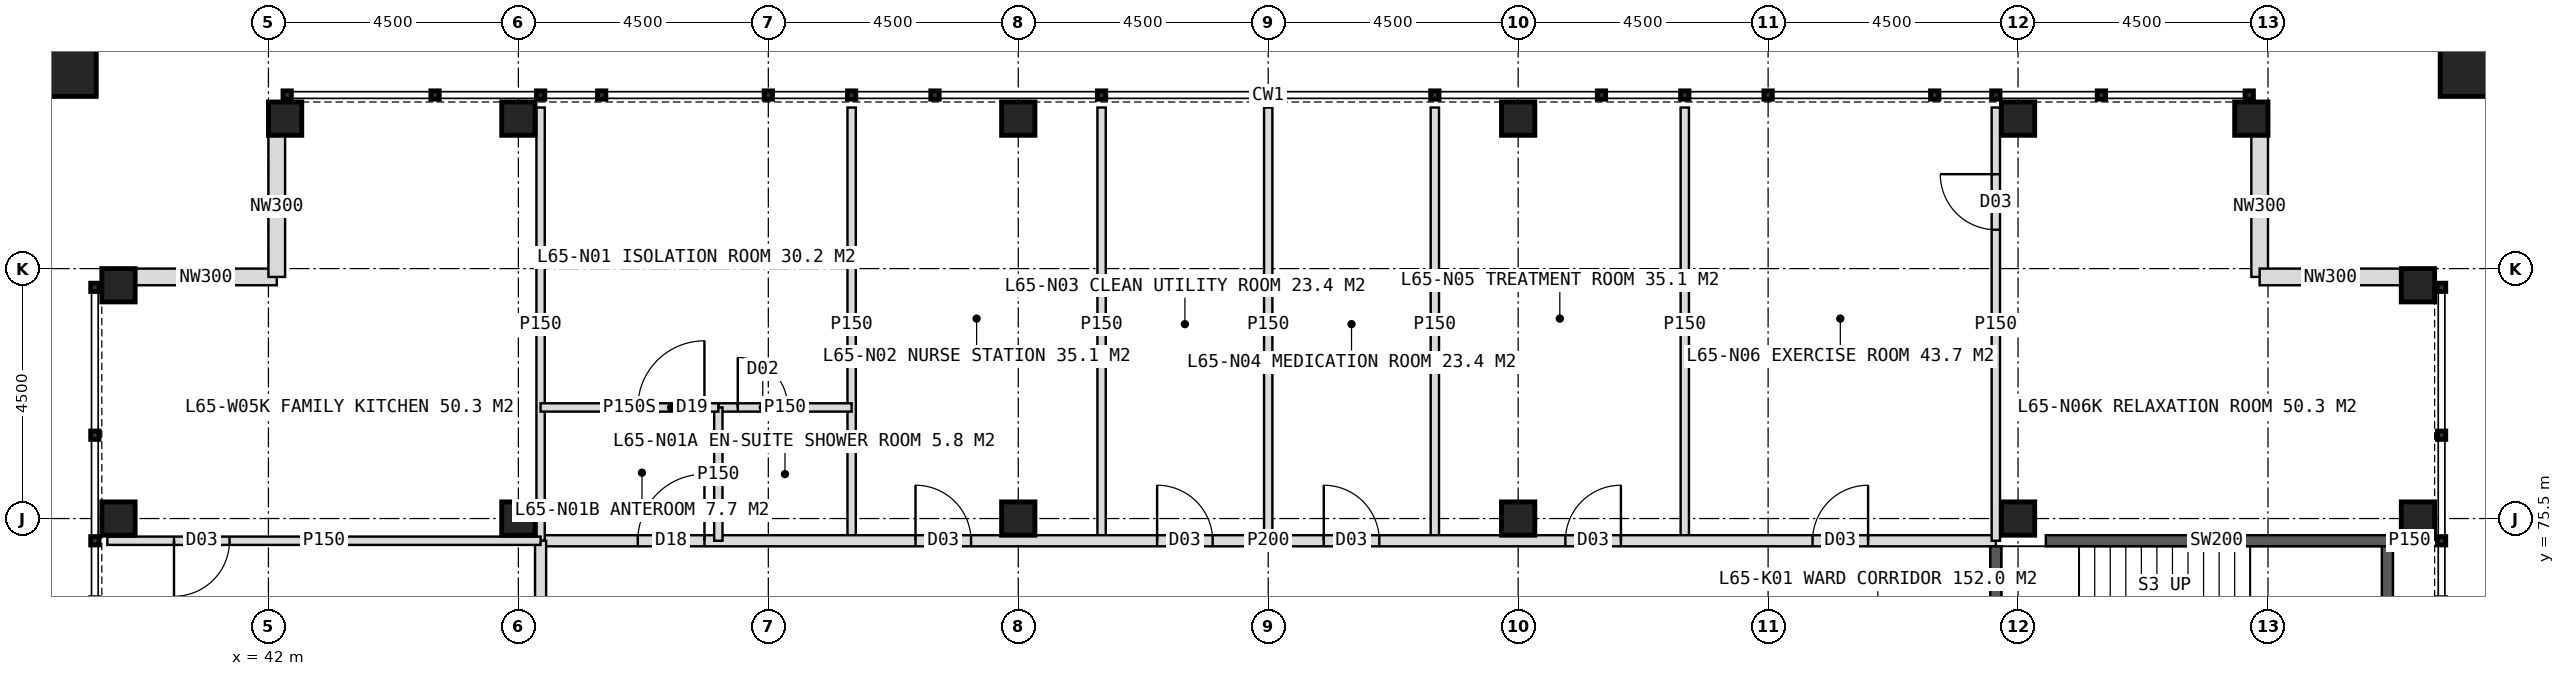
"""IFC4 building model, lengths in metres.
Left out: names, types, materials, properties, quantities, classifications, styles, units other than length and angle.
Written with IfcOpenShell. Run it as: python <this file> out.ifc"""

import sys

from ifc_helpers import new_model, si_unit, direction, frame, frame_2d, origin, origin_2d, place, context, subcontext, project, spatial, rectangle, hollow_rectangle, extrude, element, fill, save


model = new_model("IFC4")
c1 = context("Model", 3, precision=1e-05, world=origin(), true_north=direction((0.0, 1.0)))
c2 = subcontext(c1, "Body", "Model", "MODEL_VIEW")
j1 = project(units=[si_unit("LENGTHUNIT", "METRE"), si_unit("PLANEANGLEUNIT", "RADIAN")], contexts=[c1])
p1 = place(None, origin())
s1 = spatial("IfcSite", under=j1, at=p1, CompositionType="ELEMENT")
p2 = place(p1, origin())
s2 = spatial("IfcBuilding", under=s1, at=p2, CompositionType="ELEMENT")
p3 = place(p2, frame((0.0, 0.0, 270.0)))
s3 = spatial("IfcBuildingStorey", under=s2, at=p3, CompositionType="ELEMENT", Elevation=270.0)
for number, where, z_axis, x_axis in (
    (1, (73.5, 75.5, 0.0), (0.0, 0.0, 1.0), (1.0, 0.0, 0.0)),
    (2, (46.5, 75.5, 0.0), (0.0, 0.0, 1.0), (1.0, 0.0, 0.0)),
    (3, (55.5, 75.5, 0.0), (0.0, 0.0, 1.0), (1.0, 0.0, 0.0)),
    (4, (64.5, 75.5, 0.0), (0.0, 0.0, 1.0), (1.0, 0.0, 0.0)),
    (5, (42.3, 82.7, 0.0), (0.0, 0.0, 1.0), (1.0, 0.0, 0.0)),
    (6, (46.5, 82.7, 0.0), (0.0, 0.0, 1.0), (1.0, 0.0, 0.0)),
    (7, (55.5, 82.7, 0.0), (0.0, 0.0, 1.0), (1.0, 0.0, 0.0)),
    (8, (64.5, 82.7, 0.0), (0.0, 0.0, 1.0), (1.0, 0.0, 0.0)),
    (9, (73.5, 82.7, 0.0), (0.0, 0.0, 1.0), (1.0, 0.0, 0.0)),
    (10, (39.3, 75.5, 0.0), (0.0, 0.0, 1.0), (1.0, 0.0, 0.0)),
    (11, (80.7, 75.5, 0.0), (0.0, 0.0, 1.0), (1.0, 0.0, 0.0)),
    (12, (77.7, 82.7, 0.0), (0.0, 0.0, 1.0), (1.0, 0.0, 0.0)),
    (13, (39.3, 79.7, 0.0), (0.0, 0.0, 1.0), (1.0, 0.0, 0.0)),
    (14, (80.7, 79.7, 0.0), (0.0, 0.0, 1.0), (1.0, 0.0, 0.0)),
):
    element("IfcColumn", number, at=place(p3, frame(where, z_axis=z_axis, x_axis=x_axis)), inside=s3, PredefinedType="COLUMN", context=c2, shape_type="SweptSolid", body=[
        extrude(hollow_rectangle(XDim=0.6, YDim=0.6, WallThickness=0.04, at=origin_2d()), origin(), (0.0, 0.0, 1.0), 4.0),
    ])
for number, where, z_axis, x_axis in (
    (15, (81.6, 83.6, 0.0), (0.0, 0.0, 1.0), (1.0, 0.0, 0.0)),
    (16, (38.4, 83.6, 0.0), (0.0, 0.0, 1.0), (1.0, 0.0, 0.0)),
):
    element("IfcColumn", number, at=place(p3, frame(where, z_axis=z_axis, x_axis=x_axis)), inside=s3, PredefinedType="COLUMN", context=c2, shape_type="SweptSolid", body=[
        extrude(hollow_rectangle(XDim=1.0, YDim=1.0, WallThickness=0.06, at=origin_2d()), origin(), (0.0, 0.0, 1.0), 4.0),
    ])
for number, where, z_axis, x_axis in (
    (17, (77.85, 82.4, 0.0), (0.0, 0.0, 1.0), (0.0, -1.0, 0.0)),
    (18, (77.85, 79.85, 0.0), (0.0, 0.0, 1.0), (1.0, 0.0, 0.0)),
    (19, (39.6, 79.85, 0.0), (0.0, 0.0, 1.0), (1.0, 0.0, 0.0)),
    (20, (42.15, 79.85, 0.0), (0.0, 0.0, 1.0), (0.0, 1.0, 0.0)),
):
    element("IfcWall", number, at=place(p3, frame(where, z_axis=z_axis, x_axis=x_axis)), inside=s3, PredefinedType="ELEMENTEDWALL", context=c2, shape_type="SweptSolid", body=[
        extrude(rectangle(XDim=2.55, YDim=0.3, at=frame_2d((1.275, 0.0))), origin(), (0.0, 0.0, 1.0), 2.95),
    ])
for number, where, z_axis, x_axis in (
    (21, (52.5, 75.1, 0.0), (0.0, 0.0, 1.0), (0.0, 1.0, 0.0)),
    (22, (57.0, 75.1, 0.0), (0.0, 0.0, 1.0), (0.0, 1.0, 0.0)),
):
    element("IfcWall", number, at=place(p3, frame(where, z_axis=z_axis, x_axis=x_axis)), inside=s3, PredefinedType="PARTITIONING", context=c2, shape_type="SweptSolid", body=[
        extrude(rectangle(XDim=7.8, YDim=0.15, at=frame_2d((3.9, 0.0))), origin(), (0.0, 0.0, 1.0), 3.75),
    ])
p4 = place(p3, frame((60.0, 75.1, 0.0), z_axis=(0.0, 0.0, 1.0), x_axis=(0.0, 1.0, 0.0)))
e23 = element("IfcWall", 23, at=p4, inside=s3, PredefinedType="PARTITIONING", context=c2, shape_type="SweptSolid", body=[
    extrude(rectangle(XDim=7.8, YDim=0.15, at=frame_2d((3.9, 0.0))), origin(), (0.0, 0.0, 1.0), 2.75),
])
for number, where, z_axis, x_axis in (
    (24, (63.0, 75.1, 0.0), (0.0, 0.0, 1.0), (0.0, 1.0, 0.0)),
    (25, (67.5, 75.1, 0.0), (0.0, 0.0, 1.0), (0.0, 1.0, 0.0)),
):
    element("IfcWall", number, at=place(p3, frame(where, z_axis=z_axis, x_axis=x_axis)), inside=s3, PredefinedType="PARTITIONING", context=c2, shape_type="SweptSolid", body=[
        extrude(rectangle(XDim=7.8, YDim=0.15, at=frame_2d((3.9, 0.0))), origin(), (0.0, 0.0, 1.0), 3.75),
    ])
p5 = place(p3, frame((46.9, 75.1, 0.0), z_axis=(0.0, 0.0, 1.0), x_axis=(1.0, 0.0, 0.0)))
e26 = element("IfcWall", 26, at=p5, inside=s3, PredefinedType="PARTITIONING", context=c2, shape_type="SweptSolid", body=[
    extrude(rectangle(XDim=26.2, YDim=0.2, at=frame_2d((13.1, 0.0))), origin(), (0.0, 0.0, 1.0), 3.75),
])
p6 = place(p5, frame((1.75, 0.0, 0.0)))
e27 = element("IfcOpeningElement", 27, at=p6, cuts=e26, PredefinedType="OPENING", context=c2, shape_type="SweptSolid", body=[
    extrude(rectangle(XDim=1.2, YDim=2.2, at=frame_2d((0.6, 1.1))), frame((0.0, 0.11, 0.0), z_axis=(0.0, -1.0, 0.0), x_axis=(1.0, 0.0, 0.0)), (0.0, 0.0, 1.0), 0.22),
])
p7 = place(p5, frame((6.75, 0.0, 0.0)))
e28 = element("IfcOpeningElement", 28, at=p7, cuts=e26, PredefinedType="OPENING", context=c2, shape_type="SweptSolid", body=[
    extrude(rectangle(XDim=1.0, YDim=2.1, at=frame_2d((0.5, 1.05))), frame((0.0, 0.11, 0.0), z_axis=(0.0, -1.0, 0.0), x_axis=(1.0, 0.0, 0.0)), (0.0, 0.0, 1.0), 0.22),
])
p8 = place(p5, frame((11.1, 0.0, 0.0)))
e29 = element("IfcOpeningElement", 29, at=p8, cuts=e26, PredefinedType="OPENING", context=c2, shape_type="SweptSolid", body=[
    extrude(rectangle(XDim=1.0, YDim=2.1, at=frame_2d((0.5, 1.05))), frame((0.0, 0.11, 0.0), z_axis=(0.0, -1.0, 0.0), x_axis=(1.0, 0.0, 0.0)), (0.0, 0.0, 1.0), 0.22),
])
p9 = place(p5, frame((14.1, 0.0, 0.0)))
e30 = element("IfcOpeningElement", 30, at=p9, cuts=e26, PredefinedType="OPENING", context=c2, shape_type="SweptSolid", body=[
    extrude(rectangle(XDim=1.0, YDim=2.1, at=frame_2d((0.5, 1.05))), frame((0.0, 0.11, 0.0), z_axis=(0.0, -1.0, 0.0), x_axis=(1.0, 0.0, 0.0)), (0.0, 0.0, 1.0), 0.22),
])
p10 = place(p5, frame((18.45, 0.0, 0.0)))
e31 = element("IfcOpeningElement", 31, at=p10, cuts=e26, PredefinedType="OPENING", context=c2, shape_type="SweptSolid", body=[
    extrude(rectangle(XDim=1.0, YDim=2.1, at=frame_2d((0.5, 1.05))), frame((0.0, 0.11, 0.0), z_axis=(0.0, -1.0, 0.0), x_axis=(1.0, 0.0, 0.0)), (0.0, 0.0, 1.0), 0.22),
])
p11 = place(p5, frame((22.9, 0.0, 0.0)))
e32 = element("IfcOpeningElement", 32, at=p11, cuts=e26, PredefinedType="OPENING", context=c2, shape_type="SweptSolid", body=[
    extrude(rectangle(XDim=1.0, YDim=2.1, at=frame_2d((0.5, 1.05))), frame((0.0, 0.11, 0.0), z_axis=(0.0, -1.0, 0.0), x_axis=(1.0, 0.0, 0.0)), (0.0, 0.0, 1.0), 0.22),
])
p12 = place(p3, frame((46.9, 75.1, 0.0), z_axis=(0.0, 0.0, 1.0), x_axis=(0.0, 1.0, 0.0)))
e33 = element("IfcWall", 33, at=p12, inside=s3, PredefinedType="PARTITIONING", context=c2, shape_type="SweptSolid", body=[
    extrude(rectangle(XDim=7.8, YDim=0.15, at=frame_2d((3.9, 0.0))), origin(), (0.0, 0.0, 1.0), 3.75),
])
p13 = place(p3, frame((50.1, 77.5, 0.0), z_axis=(0.0, 0.0, 1.0), x_axis=(1.0, 0.0, 0.0)))
e34 = element("IfcWall", 34, at=p13, inside=s3, PredefinedType="PARTITIONING", context=c2, shape_type="SweptSolid", body=[
    extrude(rectangle(XDim=2.4, YDim=0.15, at=frame_2d((1.2, 0.0))), origin(), (0.0, 0.0, 1.0), 3.75),
])
p14 = place(p13, frame((0.35, 0.0, 0.0)))
e35 = element("IfcOpeningElement", 35, at=p14, cuts=e34, PredefinedType="OPENING", context=c2, shape_type="SweptSolid", body=[
    extrude(rectangle(XDim=0.9, YDim=2.1, at=frame_2d((0.45, 1.05))), frame((0.0, 0.085, 0.0), z_axis=(0.0, -1.0, 0.0), x_axis=(1.0, 0.0, 0.0)), (0.0, 0.0, 1.0), 0.17),
])
p15 = place(p3, frame((50.1, 75.1, 0.0), z_axis=(0.0, 0.0, 1.0), x_axis=(0.0, 1.0, 0.0)))
e36 = element("IfcWall", 36, at=p15, inside=s3, PredefinedType="PARTITIONING", context=c2, shape_type="SweptSolid", body=[
    extrude(rectangle(XDim=2.4, YDim=0.15, at=frame_2d((1.2, 0.0))), origin(), (0.0, 0.0, 1.0), 3.75),
])
p16 = place(p3, frame((46.9, 77.5, 0.0), z_axis=(0.0, 0.0, 1.0), x_axis=(1.0, 0.0, 0.0)))
e37 = element("IfcWall", 37, at=p16, inside=s3, PredefinedType="PARTITIONING", context=c2, shape_type="SweptSolid", body=[
    extrude(rectangle(XDim=3.2, YDim=0.15, at=frame_2d((1.6, 0.0))), origin(), (0.0, 0.0, 1.0), 3.75),
])
p17 = place(p16, frame((1.75, 0.0, 0.0)))
e38 = element("IfcOpeningElement", 38, at=p17, cuts=e37, PredefinedType="OPENING", context=c2, shape_type="SweptSolid", body=[
    extrude(rectangle(XDim=1.2, YDim=2.2, at=frame_2d((0.6, 1.1))), frame((0.0, 0.085, 0.0), z_axis=(0.0, -1.0, 0.0), x_axis=(1.0, 0.0, 0.0)), (0.0, 0.0, 1.0), 0.17),
])
p18 = place(p3, frame((73.1, 75.1, 0.0), z_axis=(0.0, 0.0, 1.0), x_axis=(0.0, 1.0, 0.0)))
e39 = element("IfcWall", 39, at=p18, inside=s3, PredefinedType="PARTITIONING", context=c2, shape_type="SweptSolid", body=[
    extrude(rectangle(XDim=7.8, YDim=0.15, at=frame_2d((3.9, 0.0))), origin(), (0.0, 0.0, 1.0), 3.75),
])
p19 = place(p18, frame((5.6, 0.0, 0.0)))
e40 = element("IfcOpeningElement", 40, at=p19, cuts=e39, PredefinedType="OPENING", context=c2, shape_type="SweptSolid", body=[
    extrude(rectangle(XDim=1.0, YDim=2.1, at=frame_2d((0.5, 1.05))), frame((0.0, 0.085, 0.0), z_axis=(0.0, -1.0, 0.0), x_axis=(1.0, 0.0, 0.0)), (0.0, 0.0, 1.0), 0.17),
])
p20 = place(p3, frame((46.9, 48.9, 0.0), z_axis=(0.0, 0.0, 1.0), x_axis=(0.0, 1.0, 0.0)))
e41 = element("IfcWall", 41, at=p20, inside=s3, PredefinedType="PARTITIONING", context=c2, shape_type="SweptSolid", body=[
    extrude(rectangle(XDim=26.2, YDim=0.2, at=frame_2d((13.1, 0.0))), origin(), (0.0, 0.0, 1.0), 3.75),
])
p21 = place(p20, frame((1.55, 0.0, 0.0)))
e42 = element("IfcOpeningElement", 42, at=p21, cuts=e41, PredefinedType="OPENING", context=c2, shape_type="SweptSolid", body=[
    extrude(rectangle(XDim=1.0, YDim=2.1, at=frame_2d((0.5, 1.05))), frame((0.0, 0.11, 0.0), z_axis=(0.0, -1.0, 0.0), x_axis=(1.0, 0.0, 0.0)), (0.0, 0.0, 1.0), 0.22),
])
p22 = place(p20, frame((6.6, 0.0, 0.0)))
e43 = element("IfcOpeningElement", 43, at=p22, cuts=e41, PredefinedType="OPENING", context=c2, shape_type="SweptSolid", body=[
    extrude(rectangle(XDim=1.0, YDim=2.1, at=frame_2d((0.5, 1.05))), frame((0.0, 0.11, 0.0), z_axis=(0.0, -1.0, 0.0), x_axis=(1.0, 0.0, 0.0)), (0.0, 0.0, 1.0), 0.22),
])
p23 = place(p20, frame((11.1, 0.0, 0.0)))
e44 = element("IfcOpeningElement", 44, at=p23, cuts=e41, PredefinedType="OPENING", context=c2, shape_type="SweptSolid", body=[
    extrude(rectangle(XDim=1.0, YDim=2.1, at=frame_2d((0.5, 1.05))), frame((0.0, 0.11, 0.0), z_axis=(0.0, -1.0, 0.0), x_axis=(1.0, 0.0, 0.0)), (0.0, 0.0, 1.0), 0.22),
])
p24 = place(p20, frame((18.45, 0.0, 0.0)))
e45 = element("IfcOpeningElement", 45, at=p24, cuts=e41, PredefinedType="OPENING", context=c2, shape_type="SweptSolid", body=[
    extrude(rectangle(XDim=1.2, YDim=2.2, at=frame_2d((0.6, 1.1))), frame((0.0, 0.11, 0.0), z_axis=(0.0, -1.0, 0.0), x_axis=(1.0, 0.0, 0.0)), (0.0, 0.0, 1.0), 0.22),
])
p25 = place(p20, frame((22.9, 0.0, 0.0)))
e46 = element("IfcOpeningElement", 46, at=p25, cuts=e41, PredefinedType="OPENING", context=c2, shape_type="SweptSolid", body=[
    extrude(rectangle(XDim=1.0, YDim=2.1, at=frame_2d((0.5, 1.05))), frame((0.0, 0.11, 0.0), z_axis=(0.0, -1.0, 0.0), x_axis=(1.0, 0.0, 0.0)), (0.0, 0.0, 1.0), 0.22),
])
p26 = place(p3, frame((46.9, 75.1, 0.0), z_axis=(0.0, 0.0, 1.0), x_axis=(-1.0, 0.0, 0.0)))
e47 = element("IfcWall", 47, at=p26, inside=s3, PredefinedType="PARTITIONING", context=c2, shape_type="SweptSolid", body=[
    extrude(rectangle(XDim=7.8, YDim=0.15, at=frame_2d((3.9, 0.0))), origin(), (0.0, 0.0, 1.0), 3.75),
])
p27 = place(p26, frame((5.6, 0.0, 0.0)))
e48 = element("IfcOpeningElement", 48, at=p27, cuts=e47, PredefinedType="OPENING", context=c2, shape_type="SweptSolid", body=[
    extrude(rectangle(XDim=1.0, YDim=2.1, at=frame_2d((0.5, 1.05))), frame((0.0, 0.085, 0.0), z_axis=(0.0, -1.0, 0.0), x_axis=(1.0, 0.0, 0.0)), (0.0, 0.0, 1.0), 0.17),
])
p28 = place(p3, frame((80.2, 75.1, 0.0), z_axis=(0.0, 0.0, 1.0), x_axis=(1.0, 0.0, 0.0)))
e49 = element("IfcWall", 49, at=p28, inside=s3, PredefinedType="PARTITIONING", context=c2, shape_type="SweptSolid", body=[
    extrude(rectangle(XDim=0.7, YDim=0.15, at=frame_2d((0.35, 0.0))), origin(), (0.0, 0.0, 1.0), 3.75),
])
p29 = place(p3, frame((73.1, 75.0, 0.0), z_axis=(0.0, 0.0, 1.0), x_axis=(0.0, -1.0, 0.0)))
e50 = element("IfcWall", 50, at=p29, inside=s3, PredefinedType="SOLIDWALL", context=c2, shape_type="SweptSolid", body=[
    extrude(rectangle(XDim=4.0, YDim=0.2, at=frame_2d((2.0, 0.0))), origin(), (0.0, 0.0, 1.0), 3.75),
])
p30 = place(p29, frame((1.5, 0.0, 0.0)))
e51 = element("IfcOpeningElement", 51, at=p30, cuts=e50, PredefinedType="OPENING", context=c2, shape_type="SweptSolid", body=[
    extrude(rectangle(XDim=1.2, YDim=2.1, at=frame_2d((0.6, 1.05))), frame((0.0, 0.11, 0.0), z_axis=(0.0, -1.0, 0.0), x_axis=(1.0, 0.0, 0.0)), (0.0, 0.0, 1.0), 0.22),
])
p31 = place(p3, frame((80.15, 71.0, 0.0), z_axis=(0.0, 0.0, 1.0), x_axis=(0.0, 1.0, 0.0)))
e52 = element("IfcWall", 52, at=p31, inside=s3, PredefinedType="SOLIDWALL", context=c2, shape_type="SweptSolid", body=[
    extrude(rectangle(XDim=4.1, YDim=0.2, at=frame_2d((2.05, 0.0))), origin(), (0.0, 0.0, 1.0), 3.75),
])
p32 = place(p3, frame((74.0, 75.1, 0.0), z_axis=(0.0, 0.0, 1.0), x_axis=(1.0, 0.0, 0.0)))
e53 = element("IfcWall", 53, at=p32, inside=s3, PredefinedType="SOLIDWALL", context=c2, shape_type="SweptSolid", body=[
    extrude(rectangle(XDim=6.15, YDim=0.2, at=frame_2d((3.075, 0.0))), origin(), (0.0, 0.0, 1.0), 3.75),
])
p33 = place(p17, origin())
e54 = element("IfcDoor", 54, at=p33, inside=s3, OperationType="SINGLE_SWING_RIGHT", PredefinedType="DOOR", context=c2, shape_type="SweptSolid", body=[
    extrude(rectangle(XDim=1.2, YDim=2.2, at=frame_2d((0.6, 1.1))), frame((0.0, 0.025, 0.0), z_axis=(0.0, -1.0, 0.0), x_axis=(1.0, 0.0, 0.0)), (0.0, 0.0, 1.0), 0.05),
])
fill(e38, e54)
p34 = place(p6, origin())
e55 = element("IfcDoor", 55, at=p34, inside=s3, OperationType="SINGLE_SWING_RIGHT", PredefinedType="DOOR", context=c2, shape_type="SweptSolid", body=[
    extrude(rectangle(XDim=1.2, YDim=2.2, at=frame_2d((0.6, 1.1))), frame((0.0, 0.025, 0.0), z_axis=(0.0, -1.0, 0.0), x_axis=(1.0, 0.0, 0.0)), (0.0, 0.0, 1.0), 0.05),
])
fill(e27, e55)
p35 = place(p14, origin())
e56 = element("IfcDoor", 56, at=p35, inside=s3, OperationType="SINGLE_SWING_LEFT", PredefinedType="DOOR", context=c2, shape_type="SweptSolid", body=[
    extrude(rectangle(XDim=0.9, YDim=2.1, at=frame_2d((0.45, 1.05))), frame((0.0, 0.025, 0.0), z_axis=(0.0, -1.0, 0.0), x_axis=(1.0, 0.0, 0.0)), (0.0, 0.0, 1.0), 0.05),
])
fill(e35, e56)
p36 = place(p7, origin())
e57 = element("IfcDoor", 57, at=p36, inside=s3, OperationType="SINGLE_SWING_LEFT", PredefinedType="DOOR", context=c2, shape_type="SweptSolid", body=[
    extrude(rectangle(XDim=1.0, YDim=2.1, at=frame_2d((0.5, 1.05))), frame((0.0, 0.025, 0.0), z_axis=(0.0, -1.0, 0.0), x_axis=(1.0, 0.0, 0.0)), (0.0, 0.0, 1.0), 0.05),
])
fill(e28, e57)
p37 = place(p8, origin())
e58 = element("IfcDoor", 58, at=p37, inside=s3, OperationType="SINGLE_SWING_LEFT", PredefinedType="DOOR", context=c2, shape_type="SweptSolid", body=[
    extrude(rectangle(XDim=1.0, YDim=2.1, at=frame_2d((0.5, 1.05))), frame((0.0, 0.025, 0.0), z_axis=(0.0, -1.0, 0.0), x_axis=(1.0, 0.0, 0.0)), (0.0, 0.0, 1.0), 0.05),
])
fill(e29, e58)
p38 = place(p9, origin())
e59 = element("IfcDoor", 59, at=p38, inside=s3, OperationType="SINGLE_SWING_LEFT", PredefinedType="DOOR", context=c2, shape_type="SweptSolid", body=[
    extrude(rectangle(XDim=1.0, YDim=2.1, at=frame_2d((0.5, 1.05))), frame((0.0, 0.025, 0.0), z_axis=(0.0, -1.0, 0.0), x_axis=(1.0, 0.0, 0.0)), (0.0, 0.0, 1.0), 0.05),
])
fill(e30, e59)
p39 = place(p10, origin())
e60 = element("IfcDoor", 60, at=p39, inside=s3, OperationType="SINGLE_SWING_RIGHT", PredefinedType="DOOR", context=c2, shape_type="SweptSolid", body=[
    extrude(rectangle(XDim=1.0, YDim=2.1, at=frame_2d((0.5, 1.05))), frame((0.0, 0.025, 0.0), z_axis=(0.0, -1.0, 0.0), x_axis=(1.0, 0.0, 0.0)), (0.0, 0.0, 1.0), 0.05),
])
fill(e31, e60)
p40 = place(p19, origin())
e61 = element("IfcDoor", 61, at=p40, inside=s3, OperationType="SINGLE_SWING_RIGHT", PredefinedType="DOOR", context=c2, shape_type="SweptSolid", body=[
    extrude(rectangle(XDim=1.0, YDim=2.1, at=frame_2d((0.5, 1.05))), frame((0.0, 0.025, 0.0), z_axis=(0.0, -1.0, 0.0), x_axis=(1.0, 0.0, 0.0)), (0.0, 0.0, 1.0), 0.05),
])
fill(e40, e61)
p41 = place(p11, origin())
e62 = element("IfcDoor", 62, at=p41, inside=s3, OperationType="SINGLE_SWING_RIGHT", PredefinedType="DOOR", context=c2, shape_type="SweptSolid", body=[
    extrude(rectangle(XDim=1.0, YDim=2.1, at=frame_2d((0.5, 1.05))), frame((0.0, 0.025, 0.0), z_axis=(0.0, -1.0, 0.0), x_axis=(1.0, 0.0, 0.0)), (0.0, 0.0, 1.0), 0.05),
])
fill(e32, e62)
p42 = place(p27, origin())
e63 = element("IfcDoor", 63, at=p42, inside=s3, OperationType="SINGLE_SWING_RIGHT", PredefinedType="DOOR", context=c2, shape_type="SweptSolid", body=[
    extrude(rectangle(XDim=1.0, YDim=2.1, at=frame_2d((0.5, 1.05))), frame((0.0, 0.025, 0.0), z_axis=(0.0, -1.0, 0.0), x_axis=(1.0, 0.0, 0.0)), (0.0, 0.0, 1.0), 0.05),
])
fill(e48, e63)
save(model, sys.argv[1])
